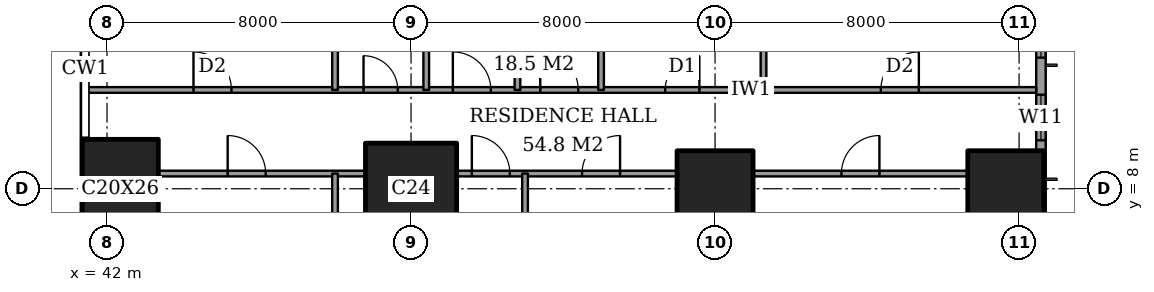
"""IFC4 building model, lengths in metres.
Left out: names, types, materials, properties, quantities, classifications, styles, units other than length and angle.
Written with IfcOpenShell. Run it as: python <this file> out.ifc"""

import sys

from ifc_helpers import new_model, si_unit, direction, frame, frame_2d, origin, origin_2d, place, context, subcontext, project, spatial, rectangle, extrude, element, fill, save


model = new_model("IFC4")
c1 = context("Model", 3, precision=1e-05, world=origin(), true_north=direction((0.0, 1.0)))
c2 = subcontext(c1, "Body", "Model", "MODEL_VIEW")
j1 = project(units=[si_unit("LENGTHUNIT", "METRE"), si_unit("PLANEANGLEUNIT", "RADIAN")], contexts=[c1])
p1 = place(None, origin())
s1 = spatial("IfcSite", under=j1, at=p1, CompositionType="ELEMENT")
p2 = place(p1, origin())
s2 = spatial("IfcBuilding", under=s1, at=p2, CompositionType="ELEMENT")
p3 = place(p2, frame((0.0, 0.0, 150.2)))
s3 = spatial("IfcBuildingStorey", under=s2, at=p3, CompositionType="ELEMENT", Elevation=150.2)
p4 = place(p3, frame((42.35, 8.0, 0.0), z_axis=(0.0, 0.0, 1.0), x_axis=(1.0, 0.0, 0.0)))
e1 = element("IfcColumn", 1, at=p4, inside=s3, PredefinedType="COLUMN", context=c2, shape_type="SweptSolid", body=[
    extrude(rectangle(XDim=2.0, YDim=2.6, at=origin_2d()), origin(), (0.0, 0.0, 1.0), 3.6),
])
p5 = place(p3, frame((50.0, 8.0, 0.0), z_axis=(0.0, 0.0, 1.0), x_axis=(1.0, 0.0, 0.0)))
e2 = element("IfcColumn", 2, at=p5, inside=s3, PredefinedType="COLUMN", context=c2, shape_type="SweptSolid", body=[
    extrude(rectangle(XDim=2.4, YDim=2.4, at=origin_2d()), origin(), (0.0, 0.0, 1.0), 3.6),
])
for number, where, z_axis, x_axis in (
    (3, (58.0, 8.0, 0.0), (0.0, 0.0, 1.0), (1.0, 0.0, 0.0)),
    (4, (65.65, 8.0, 0.0), (0.0, 0.0, 1.0), (1.0, 0.0, 0.0)),
):
    element("IfcColumn", number, at=place(p3, frame(where, z_axis=z_axis, x_axis=x_axis)), inside=s3, PredefinedType="COLUMN", context=c2, shape_type="SweptSolid", body=[
        extrude(rectangle(XDim=2.0, YDim=2.0, at=origin_2d()), origin(), (0.0, 0.0, 1.0), 3.6),
    ])
p6 = place(p3, frame((66.575, 3.175, 0.0), z_axis=(0.0, 0.0, 1.0), x_axis=(0.0, 1.0, 0.0)))
e5 = element("IfcWall", 5, at=p6, inside=s3, PredefinedType="SOLIDWALL", context=c2, shape_type="SweptSolid", body=[
    extrude(rectangle(XDim=41.65, YDim=0.25, at=frame_2d((20.825, 0.0))), origin(), (0.0, 0.0, 1.0), 3.6),
])
p7 = place(p6, frame((0.775, 0.0, 0.4)))
e6 = element("IfcOpeningElement", 6, at=p7, cuts=e5, PredefinedType="OPENING", context=c2, shape_type="SweptSolid", body=[
    extrude(rectangle(XDim=2.4, YDim=2.2, at=frame_2d((1.2, 1.1))), frame((0.0, 0.135, 0.0), z_axis=(0.0, -1.0, 0.0), x_axis=(1.0, 0.0, 0.0)), (0.0, 0.0, 1.0), 0.27),
])
p8 = place(p6, frame((6.1, 0.0, 0.4)))
e7 = element("IfcOpeningElement", 7, at=p8, cuts=e5, PredefinedType="OPENING", context=c2, shape_type="SweptSolid", body=[
    extrude(rectangle(XDim=1.2, YDim=2.2, at=frame_2d((0.6, 1.1))), frame((0.0, 0.135, 0.0), z_axis=(0.0, -1.0, 0.0), x_axis=(1.0, 0.0, 0.0)), (0.0, 0.0, 1.0), 0.27),
])
p9 = place(p6, frame((8.275, 0.0, 0.4)))
e8 = element("IfcOpeningElement", 8, at=p9, cuts=e5, PredefinedType="OPENING", context=c2, shape_type="SweptSolid", body=[
    extrude(rectangle(XDim=2.4, YDim=2.2, at=frame_2d((1.2, 1.1))), frame((0.0, 0.135, 0.0), z_axis=(0.0, -1.0, 0.0), x_axis=(1.0, 0.0, 0.0)), (0.0, 0.0, 1.0), 0.27),
])
p10 = place(p6, frame((15.775, 0.0, 0.4)))
e9 = element("IfcOpeningElement", 9, at=p10, cuts=e5, PredefinedType="OPENING", context=c2, shape_type="SweptSolid", body=[
    extrude(rectangle(XDim=2.4, YDim=2.2, at=frame_2d((1.2, 1.1))), frame((0.0, 0.135, 0.0), z_axis=(0.0, -1.0, 0.0), x_axis=(1.0, 0.0, 0.0)), (0.0, 0.0, 1.0), 0.27),
])
p11 = place(p6, frame((23.475, 0.0, 0.4)))
e10 = element("IfcOpeningElement", 10, at=p11, cuts=e5, PredefinedType="OPENING", context=c2, shape_type="SweptSolid", body=[
    extrude(rectangle(XDim=2.4, YDim=2.2, at=frame_2d((1.2, 1.1))), frame((0.0, 0.135, 0.0), z_axis=(0.0, -1.0, 0.0), x_axis=(1.0, 0.0, 0.0)), (0.0, 0.0, 1.0), 0.27),
])
p12 = place(p6, frame((30.875, 0.0, 0.4)))
e11 = element("IfcOpeningElement", 11, at=p12, cuts=e5, PredefinedType="OPENING", context=c2, shape_type="SweptSolid", body=[
    extrude(rectangle(XDim=2.4, YDim=2.2, at=frame_2d((1.2, 1.1))), frame((0.0, 0.135, 0.0), z_axis=(0.0, -1.0, 0.0), x_axis=(1.0, 0.0, 0.0)), (0.0, 0.0, 1.0), 0.27),
])
p13 = place(p6, frame((34.325, 0.0, 0.4)))
e12 = element("IfcOpeningElement", 12, at=p13, cuts=e5, PredefinedType="OPENING", context=c2, shape_type="SweptSolid", body=[
    extrude(rectangle(XDim=1.2, YDim=2.2, at=frame_2d((0.6, 1.1))), frame((0.0, 0.135, 0.0), z_axis=(0.0, -1.0, 0.0), x_axis=(1.0, 0.0, 0.0)), (0.0, 0.0, 1.0), 0.27),
])
p14 = place(p6, frame((38.475, 0.0, 0.4)))
e13 = element("IfcOpeningElement", 13, at=p14, cuts=e5, PredefinedType="OPENING", context=c2, shape_type="SweptSolid", body=[
    extrude(rectangle(XDim=2.4, YDim=2.2, at=frame_2d((1.2, 1.1))), frame((0.0, 0.135, 0.0), z_axis=(0.0, -1.0, 0.0), x_axis=(1.0, 0.0, 0.0)), (0.0, 0.0, 1.0), 0.27),
])
p15 = place(p3, frame((43.35, 8.4, 0.0), z_axis=(0.0, 0.0, 1.0), x_axis=(1.0, 0.0, 0.0)))
e14 = element("IfcWall", 14, at=p15, inside=s3, PredefinedType="PARTITIONING", context=c2, shape_type="SweptSolid", body=[
    extrude(rectangle(XDim=5.45, YDim=0.15, at=frame_2d((2.725, 0.0))), origin(), (0.0, 0.0, 1.0), 3.35),
])
p16 = place(p15, frame((1.825, 0.0, 0.0)))
e15 = element("IfcOpeningElement", 15, at=p16, cuts=e14, PredefinedType="OPENING", context=c2, shape_type="SweptSolid", body=[
    extrude(rectangle(XDim=1.0, YDim=2.1, at=frame_2d((0.5, 1.05))), frame((0.0, 0.085, 0.0), z_axis=(0.0, -1.0, 0.0), x_axis=(1.0, 0.0, 0.0)), (0.0, 0.0, 1.0), 0.17),
])
p17 = place(p3, frame((51.2, 8.4, 0.0), z_axis=(0.0, 0.0, 1.0), x_axis=(1.0, 0.0, 0.0)))
e16 = element("IfcWall", 16, at=p17, inside=s3, PredefinedType="PARTITIONING", context=c2, shape_type="SweptSolid", body=[
    extrude(rectangle(XDim=5.8, YDim=0.15, at=frame_2d((2.9, 0.0))), origin(), (0.0, 0.0, 1.0), 3.35),
])
p18 = place(p17, frame((3.3, 0.0, 0.0)))
e17 = element("IfcOpeningElement", 17, at=p18, cuts=e16, PredefinedType="OPENING", context=c2, shape_type="SweptSolid", body=[
    extrude(rectangle(XDim=1.0, YDim=2.1, at=frame_2d((0.5, 1.05))), frame((0.0, 0.085, 0.0), z_axis=(0.0, -1.0, 0.0), x_axis=(1.0, 0.0, 0.0)), (0.0, 0.0, 1.0), 0.17),
])
p19 = place(p17, frame((0.4, 0.0, 0.0)))
e18 = element("IfcOpeningElement", 18, at=p19, cuts=e16, PredefinedType="OPENING", context=c2, shape_type="SweptSolid", body=[
    extrude(rectangle(XDim=1.0, YDim=2.1, at=frame_2d((0.5, 1.05))), frame((0.0, 0.085, 0.0), z_axis=(0.0, -1.0, 0.0), x_axis=(1.0, 0.0, 0.0)), (0.0, 0.0, 1.0), 0.17),
])
p20 = place(p3, frame((59.0, 8.4, 0.0), z_axis=(0.0, 0.0, 1.0), x_axis=(1.0, 0.0, 0.0)))
e19 = element("IfcWall", 19, at=p20, inside=s3, PredefinedType="PARTITIONING", context=c2, shape_type="SweptSolid", body=[
    extrude(rectangle(XDim=5.65, YDim=0.15, at=frame_2d((2.825, 0.0))), origin(), (0.0, 0.0, 1.0), 3.35),
])
p21 = place(p20, frame((2.325, 0.0, 0.0)))
e20 = element("IfcOpeningElement", 20, at=p21, cuts=e19, PredefinedType="OPENING", context=c2, shape_type="SweptSolid", body=[
    extrude(rectangle(XDim=1.0, YDim=2.1, at=frame_2d((0.5, 1.05))), frame((0.0, 0.085, 0.0), z_axis=(0.0, -1.0, 0.0), x_axis=(1.0, 0.0, 0.0)), (0.0, 0.0, 1.0), 0.17),
])
p22 = place(p3, frame((41.439, 10.6, 0.0), z_axis=(0.0, 0.0, 1.0), x_axis=(1.0, 0.0, 0.0)))
e21 = element("IfcWall", 21, at=p22, inside=s3, PredefinedType="PARTITIONING", context=c2, shape_type="SweptSolid", body=[
    extrude(rectangle(XDim=25.011, YDim=0.15, at=frame_2d((12.505, 0.0))), origin(), (0.0, 0.0, 1.0), 3.35),
])
p23 = place(p22, frame((11.961, 0.0, 0.0)))
e22 = element("IfcOpeningElement", 22, at=p23, cuts=e21, PredefinedType="OPENING", context=c2, shape_type="SweptSolid", body=[
    extrude(rectangle(XDim=1.0, YDim=2.1, at=frame_2d((0.5, 1.05))), frame((0.0, 0.085, 0.0), z_axis=(0.0, -1.0, 0.0), x_axis=(1.0, 0.0, 0.0)), (0.0, 0.0, 1.0), 0.17),
])
p24 = place(p22, frame((20.924, 0.0, 0.0)))
e23 = element("IfcOpeningElement", 23, at=p24, cuts=e21, PredefinedType="OPENING", context=c2, shape_type="SweptSolid", body=[
    extrude(rectangle(XDim=1.0, YDim=2.1, at=frame_2d((0.5, 1.05))), frame((0.0, 0.085, 0.0), z_axis=(0.0, -1.0, 0.0), x_axis=(1.0, 0.0, 0.0)), (0.0, 0.0, 1.0), 0.17),
])
p25 = place(p22, frame((15.249, 0.0, 0.0)))
e24 = element("IfcOpeningElement", 24, at=p25, cuts=e21, PredefinedType="OPENING", context=c2, shape_type="SweptSolid", body=[
    extrude(rectangle(XDim=0.9, YDim=2.1, at=frame_2d((0.45, 1.05))), frame((0.0, 0.085, 0.0), z_axis=(0.0, -1.0, 0.0), x_axis=(1.0, 0.0, 0.0)), (0.0, 0.0, 1.0), 0.17),
])
p26 = place(p22, frame((9.661, 0.0, 0.0)))
e25 = element("IfcOpeningElement", 25, at=p26, cuts=e21, PredefinedType="OPENING", context=c2, shape_type="SweptSolid", body=[
    extrude(rectangle(XDim=1.0, YDim=2.1, at=frame_2d((0.5, 1.05))), frame((0.0, 0.085, 0.0), z_axis=(0.0, -1.0, 0.0), x_axis=(1.0, 0.0, 0.0)), (0.0, 0.0, 1.0), 0.17),
])
p27 = place(p22, frame((7.311, 0.0, 0.0)))
e26 = element("IfcOpeningElement", 26, at=p27, cuts=e21, PredefinedType="OPENING", context=c2, shape_type="SweptSolid", body=[
    extrude(rectangle(XDim=0.9, YDim=2.1, at=frame_2d((0.45, 1.05))), frame((0.0, 0.085, 0.0), z_axis=(0.0, -1.0, 0.0), x_axis=(1.0, 0.0, 0.0)), (0.0, 0.0, 1.0), 0.17),
])
p28 = place(p22, frame((2.836, 0.0, 0.0)))
e27 = element("IfcOpeningElement", 27, at=p28, cuts=e21, PredefinedType="OPENING", context=c2, shape_type="SweptSolid", body=[
    extrude(rectangle(XDim=1.0, YDim=2.1, at=frame_2d((0.5, 1.05))), frame((0.0, 0.085, 0.0), z_axis=(0.0, -1.0, 0.0), x_axis=(1.0, 0.0, 0.0)), (0.0, 0.0, 1.0), 0.17),
])
p29 = place(p3, frame((48.0, -0.45, 0.0), z_axis=(0.0, 0.0, 1.0), x_axis=(0.0, 1.0, 0.0)))
e28 = element("IfcWall", 28, at=p29, inside=s3, PredefinedType="PARTITIONING", context=c2, shape_type="SweptSolid", body=[
    extrude(rectangle(XDim=8.85, YDim=0.15, at=frame_2d((4.425, 0.0))), origin(), (0.0, 0.0, 1.0), 3.35),
])
p30 = place(p3, frame((48.0, 10.6, 0.0), z_axis=(0.0, 0.0, 1.0), x_axis=(0.0, 1.0, 0.0)))
e29 = element("IfcWall", 29, at=p30, inside=s3, PredefinedType="PARTITIONING", context=c2, shape_type="SweptSolid", body=[
    extrude(rectangle(XDim=8.4, YDim=0.15, at=frame_2d((4.2, 0.0))), origin(), (0.0, 0.0, 1.0), 3.35),
])
p31 = place(p30, frame((6.7, 0.0, 0.0)))
e30 = element("IfcOpeningElement", 30, at=p31, cuts=e29, PredefinedType="OPENING", context=c2, shape_type="SweptSolid", body=[
    extrude(rectangle(XDim=0.9, YDim=2.1, at=frame_2d((0.45, 1.05))), frame((0.0, 0.085, 0.0), z_axis=(0.0, -1.0, 0.0), x_axis=(1.0, 0.0, 0.0)), (0.0, 0.0, 1.0), 0.17),
])
p32 = place(p3, frame((50.4, 10.6, 0.0), z_axis=(0.0, 0.0, 1.0), x_axis=(0.0, 1.0, 0.0)))
e31 = element("IfcWall", 31, at=p32, inside=s3, PredefinedType="PARTITIONING", context=c2, shape_type="SweptSolid", body=[
    extrude(rectangle(XDim=4.2, YDim=0.15, at=frame_2d((2.1, 0.0))), origin(), (0.0, 0.0, 1.0), 3.35),
])
p33 = place(p3, frame((52.8, 10.6, 0.0), z_axis=(0.0, 0.0, 1.0), x_axis=(0.0, 1.0, 0.0)))
e32 = element("IfcWall", 32, at=p33, inside=s3, PredefinedType="PARTITIONING", context=c2, shape_type="SweptSolid", body=[
    extrude(rectangle(XDim=8.4, YDim=0.15, at=frame_2d((4.2, 0.0))), origin(), (0.0, 0.0, 1.0), 3.35),
])
p34 = place(p3, frame((53.0, -0.45, 0.0), z_axis=(0.0, 0.0, 1.0), x_axis=(0.0, 1.0, 0.0)))
e33 = element("IfcWall", 33, at=p34, inside=s3, PredefinedType="PARTITIONING", context=c2, shape_type="SweptSolid", body=[
    extrude(rectangle(XDim=8.85, YDim=0.15, at=frame_2d((4.425, 0.0))), origin(), (0.0, 0.0, 1.0), 3.35),
])
p35 = place(p3, frame((55.0, 10.6, 0.0), z_axis=(0.0, 0.0, 1.0), x_axis=(0.0, 1.0, 0.0)))
e34 = element("IfcWall", 34, at=p35, inside=s3, PredefinedType="PARTITIONING", context=c2, shape_type="SweptSolid", body=[
    extrude(rectangle(XDim=11.0, YDim=0.15, at=frame_2d((5.5, 0.0))), origin(), (0.0, 0.0, 1.0), 3.35),
])
p36 = place(p35, frame((9.2, 0.0, 0.0)))
e35 = element("IfcOpeningElement", 35, at=p36, cuts=e34, PredefinedType="OPENING", context=c2, shape_type="SweptSolid", body=[
    extrude(rectangle(XDim=1.0, YDim=2.1, at=frame_2d((0.5, 1.05))), frame((0.0, 0.085, 0.0), z_axis=(0.0, -1.0, 0.0), x_axis=(1.0, 0.0, 0.0)), (0.0, 0.0, 1.0), 0.17),
])
p37 = place(p3, frame((59.275, 10.6, 0.0), z_axis=(0.0, 0.0, 1.0), x_axis=(0.0, 1.0, 0.0)))
e36 = element("IfcWall", 36, at=p37, inside=s3, PredefinedType="PARTITIONING", context=c2, shape_type="SweptSolid", body=[
    extrude(rectangle(XDim=4.2, YDim=0.15, at=frame_2d((2.1, 0.0))), origin(), (0.0, 0.0, 1.0), 3.35),
])
p38 = place(p8, origin())
e37 = element("IfcWindow", 37, at=p38, inside=s3, PartitioningType="SINGLE_PANEL", PredefinedType="WINDOW", context=c2, shape_type="SweptSolid", body=[
    extrude(rectangle(XDim=1.2, YDim=2.2, at=frame_2d((0.6, 1.1))), frame((0.0, 0.03, 0.0), z_axis=(0.0, -1.0, 0.0), x_axis=(1.0, 0.0, 0.0)), (0.0, 0.0, 1.0), 0.06),
])
fill(e7, e37)
p39 = place(p9, origin())
e38 = element("IfcWindow", 38, at=p39, inside=s3, PartitioningType="SINGLE_PANEL", PredefinedType="WINDOW", context=c2, shape_type="SweptSolid", body=[
    extrude(rectangle(XDim=2.4, YDim=2.2, at=frame_2d((1.2, 1.1))), frame((0.0, 0.03, 0.0), z_axis=(0.0, -1.0, 0.0), x_axis=(1.0, 0.0, 0.0)), (0.0, 0.0, 1.0), 0.06),
])
fill(e8, e38)
p40 = place(p21, origin())
e39 = element("IfcDoor", 39, at=p40, inside=s3, OperationType="SINGLE_SWING_LEFT", PredefinedType="DOOR", context=c2, shape_type="SweptSolid", body=[
    extrude(rectangle(XDim=1.0, YDim=2.1, at=frame_2d((0.5, 1.05))), frame((0.0, 0.025, 0.0), z_axis=(0.0, -1.0, 0.0), x_axis=(1.0, 0.0, 0.0)), (0.0, 0.0, 1.0), 0.05),
])
fill(e20, e39)
p41 = place(p18, origin())
e40 = element("IfcDoor", 40, at=p41, inside=s3, OperationType="SINGLE_SWING_LEFT", PredefinedType="DOOR", context=c2, shape_type="SweptSolid", body=[
    extrude(rectangle(XDim=1.0, YDim=2.1, at=frame_2d((0.5, 1.05))), frame((0.0, 0.025, 0.0), z_axis=(0.0, -1.0, 0.0), x_axis=(1.0, 0.0, 0.0)), (0.0, 0.0, 1.0), 0.05),
])
fill(e17, e40)
p42 = place(p19, origin())
e41 = element("IfcDoor", 41, at=p42, inside=s3, OperationType="SINGLE_SWING_RIGHT", PredefinedType="DOOR", context=c2, shape_type="SweptSolid", body=[
    extrude(rectangle(XDim=1.0, YDim=2.1, at=frame_2d((0.5, 1.05))), frame((0.0, 0.025, 0.0), z_axis=(0.0, -1.0, 0.0), x_axis=(1.0, 0.0, 0.0)), (0.0, 0.0, 1.0), 0.05),
])
fill(e18, e41)
p43 = place(p16, origin())
e42 = element("IfcDoor", 42, at=p43, inside=s3, OperationType="SINGLE_SWING_RIGHT", PredefinedType="DOOR", context=c2, shape_type="SweptSolid", body=[
    extrude(rectangle(XDim=1.0, YDim=2.1, at=frame_2d((0.5, 1.05))), frame((0.0, 0.025, 0.0), z_axis=(0.0, -1.0, 0.0), x_axis=(1.0, 0.0, 0.0)), (0.0, 0.0, 1.0), 0.05),
])
fill(e15, e42)
p44 = place(p23, origin())
e43 = element("IfcDoor", 43, at=p44, inside=s3, OperationType="SINGLE_SWING_RIGHT", PredefinedType="DOOR", context=c2, shape_type="SweptSolid", body=[
    extrude(rectangle(XDim=1.0, YDim=2.1, at=frame_2d((0.5, 1.05))), frame((0.0, 0.025, 0.0), z_axis=(0.0, -1.0, 0.0), x_axis=(1.0, 0.0, 0.0)), (0.0, 0.0, 1.0), 0.05),
])
fill(e22, e43)
p45 = place(p24, origin())
e44 = element("IfcDoor", 44, at=p45, inside=s3, OperationType="SINGLE_SWING_LEFT", PredefinedType="DOOR", context=c2, shape_type="SweptSolid", body=[
    extrude(rectangle(XDim=1.0, YDim=2.1, at=frame_2d((0.5, 1.05))), frame((0.0, 0.025, 0.0), z_axis=(0.0, -1.0, 0.0), x_axis=(1.0, 0.0, 0.0)), (0.0, 0.0, 1.0), 0.05),
])
fill(e23, e44)
p46 = place(p25, origin())
e45 = element("IfcDoor", 45, at=p46, inside=s3, OperationType="SINGLE_SWING_LEFT", PredefinedType="DOOR", context=c2, shape_type="SweptSolid", body=[
    extrude(rectangle(XDim=0.9, YDim=2.1, at=frame_2d((0.45, 1.05))), frame((0.0, 0.025, 0.0), z_axis=(0.0, -1.0, 0.0), x_axis=(1.0, 0.0, 0.0)), (0.0, 0.0, 1.0), 0.05),
])
fill(e24, e45)
p47 = place(p26, origin())
e46 = element("IfcDoor", 46, at=p47, inside=s3, OperationType="SINGLE_SWING_RIGHT", PredefinedType="DOOR", context=c2, shape_type="SweptSolid", body=[
    extrude(rectangle(XDim=1.0, YDim=2.1, at=frame_2d((0.5, 1.05))), frame((0.0, 0.025, 0.0), z_axis=(0.0, -1.0, 0.0), x_axis=(1.0, 0.0, 0.0)), (0.0, 0.0, 1.0), 0.05),
])
fill(e25, e46)
p48 = place(p27, origin())
e47 = element("IfcDoor", 47, at=p48, inside=s3, OperationType="SINGLE_SWING_RIGHT", PredefinedType="DOOR", context=c2, shape_type="SweptSolid", body=[
    extrude(rectangle(XDim=0.9, YDim=2.1, at=frame_2d((0.45, 1.05))), frame((0.0, 0.025, 0.0), z_axis=(0.0, -1.0, 0.0), x_axis=(1.0, 0.0, 0.0)), (0.0, 0.0, 1.0), 0.05),
])
fill(e26, e47)
p49 = place(p28, origin())
e48 = element("IfcDoor", 48, at=p49, inside=s3, OperationType="SINGLE_SWING_RIGHT", PredefinedType="DOOR", context=c2, shape_type="SweptSolid", body=[
    extrude(rectangle(XDim=1.0, YDim=2.1, at=frame_2d((0.5, 1.05))), frame((0.0, 0.025, 0.0), z_axis=(0.0, -1.0, 0.0), x_axis=(1.0, 0.0, 0.0)), (0.0, 0.0, 1.0), 0.05),
])
fill(e27, e48)
save(model, sys.argv[1])
